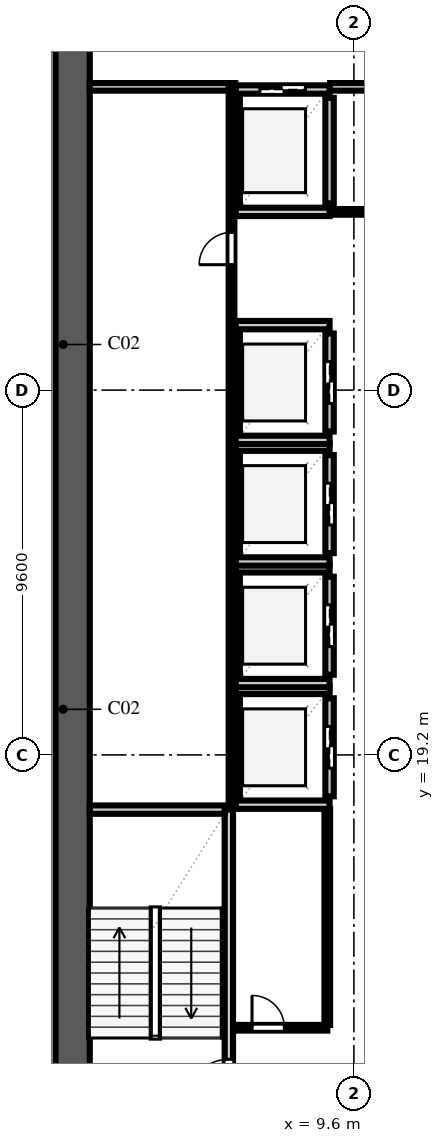
"""IFC4 building model, lengths in metres.
Left out: names, types, materials, properties, quantities, classifications, styles, units other than length and angle.
Written with IfcOpenShell. Run it as: python <this file> out.ifc"""

import sys

from ifc_helpers import new_model, si_unit, direction, frame, frame_2d, origin, place, context, subcontext, project, spatial, rectangle, extrude, element, fill, save


model = new_model("IFC4")
c1 = context("Model", 3, precision=1e-05, world=origin(), true_north=direction((0.0, 1.0)))
c2 = subcontext(c1, "Body", "Model", "MODEL_VIEW")
j1 = project(units=[si_unit("LENGTHUNIT", "METRE"), si_unit("PLANEANGLEUNIT", "RADIAN")], contexts=[c1])
p1 = place(None, origin())
s1 = spatial("IfcSite", under=j1, at=p1, CompositionType="ELEMENT")
p2 = place(p1, origin())
s2 = spatial("IfcBuilding", under=s1, at=p2, CompositionType="ELEMENT")
p3 = place(p2, frame((0.0, 0.0, 19.6)))
s3 = spatial("IfcBuildingStorey", under=s2, at=p3, CompositionType="ELEMENT", Elevation=19.6)
p4 = place(p3, frame((2.2, 9.15, 0.0), z_axis=(0.0, 0.0, 1.0), x_axis=(0.0, 1.0, 0.0)))
e1 = element("IfcWall", 1, at=p4, inside=s3, PredefinedType="SHEAR", context=c2, shape_type="SweptSolid", body=[
    extrude(rectangle(XDim=39.3, YDim=0.9, at=frame_2d((19.65, 0.0))), origin(), (0.0, 0.0, 1.0), 4.34),
])
p5 = place(p3, frame((6.31, 9.95, 0.0), z_axis=(0.0, 0.0, 1.0), x_axis=(0.0, 1.0, 0.0)))
e2 = element("IfcWall", 2, at=p5, inside=s3, PredefinedType="SOLIDWALL", context=c2, shape_type="SweptSolid", body=[
    extrude(rectangle(XDim=7.81, YDim=0.22, at=frame_2d((3.905, 0.0))), origin(), (0.0, 0.0, 1.0), 4.34),
])
p6 = place(p5, frame((0.14, 0.0, 0.0)))
e3 = element("IfcOpeningElement", 3, at=p6, cuts=e2, PredefinedType="OPENING", context=c2, shape_type="SweptSolid", body=[
    extrude(rectangle(XDim=1.1, YDim=2.2, at=frame_2d((0.55, 1.1))), frame((0.0, 0.122, 0.0), z_axis=(0.0, -1.0, 0.0), x_axis=(1.0, 0.0, 0.0)), (0.0, 0.0, 1.0), 0.244),
])
p7 = place(p3, frame((2.65, 17.76, 0.0), z_axis=(0.0, 0.0, 1.0), x_axis=(1.0, 0.0, 0.0)))
e4 = element("IfcWall", 4, at=p7, inside=s3, PredefinedType="SOLIDWALL", context=c2, shape_type="SweptSolid", body=[
    extrude(rectangle(XDim=3.55, YDim=0.22, at=frame_2d((1.775, 0.0))), origin(), (0.0, 0.0, 1.0), 4.34),
])
p8 = place(p3, frame((6.49, 18.11, 0.0), z_axis=(0.0, 0.0, 1.0), x_axis=(0.0, 1.0, 0.0)))
e5 = element("IfcWall", 5, at=p8, inside=s3, PredefinedType="SOLIDWALL", context=c2, shape_type="SweptSolid", body=[
    extrude(rectangle(XDim=2.58, YDim=0.22, at=frame_2d((1.29, 0.0))), origin(), (0.0, 0.0, 1.0), 4.34),
])
p9 = place(p3, frame((8.96, 18.11, 0.0), z_axis=(0.0, 0.0, 1.0), x_axis=(0.0, 1.0, 0.0)))
e6 = element("IfcWall", 6, at=p9, inside=s3, PredefinedType="SOLIDWALL", context=c2, shape_type="SweptSolid", body=[
    extrude(rectangle(XDim=2.58, YDim=0.22, at=frame_2d((1.29, 0.0))), origin(), (0.0, 0.0, 1.0), 4.34),
])
p10 = place(p9, frame((0.74, 0.0, 0.0)))
e7 = element("IfcOpeningElement", 7, at=p10, cuts=e6, PredefinedType="OPENING", context=c2, shape_type="SweptSolid", body=[
    extrude(rectangle(XDim=1.1, YDim=2.2, at=frame_2d((0.55, 1.1))), frame((0.0, 0.122, 0.0), z_axis=(0.0, -1.0, 0.0), x_axis=(1.0, 0.0, 0.0)), (0.0, 0.0, 1.0), 0.244),
])
for number, where, z_axis, x_axis in (
    (8, (6.49, 17.89, 0.0), (0.0, 0.0, 1.0), (1.0, 0.0, 0.0)),
    (9, (6.49, 20.91, 0.0), (0.0, 0.0, 1.0), (1.0, 0.0, 0.0)),
):
    element("IfcWall", number, at=place(p3, frame(where, z_axis=z_axis, x_axis=x_axis)), inside=s3, PredefinedType="SOLIDWALL", context=c2, shape_type="SweptSolid", body=[
        extrude(rectangle(XDim=2.47, YDim=0.22, at=frame_2d((1.235, 0.0))), origin(), (0.0, 0.0, 1.0), 4.34),
    ])
p11 = place(p3, frame((6.49, 21.31, 0.0), z_axis=(0.0, 0.0, 1.0), x_axis=(0.0, 1.0, 0.0)))
e10 = element("IfcWall", 10, at=p11, inside=s3, PredefinedType="SOLIDWALL", context=c2, shape_type="SweptSolid", body=[
    extrude(rectangle(XDim=2.58, YDim=0.22, at=frame_2d((1.29, 0.0))), origin(), (0.0, 0.0, 1.0), 4.34),
])
p12 = place(p3, frame((8.96, 21.31, 0.0), z_axis=(0.0, 0.0, 1.0), x_axis=(0.0, 1.0, 0.0)))
e11 = element("IfcWall", 11, at=p12, inside=s3, PredefinedType="SOLIDWALL", context=c2, shape_type="SweptSolid", body=[
    extrude(rectangle(XDim=2.58, YDim=0.22, at=frame_2d((1.29, 0.0))), origin(), (0.0, 0.0, 1.0), 4.34),
])
p13 = place(p12, frame((0.74, 0.0, 0.0)))
e12 = element("IfcOpeningElement", 12, at=p13, cuts=e11, PredefinedType="OPENING", context=c2, shape_type="SweptSolid", body=[
    extrude(rectangle(XDim=1.1, YDim=2.2, at=frame_2d((0.55, 1.1))), frame((0.0, 0.122, 0.0), z_axis=(0.0, -1.0, 0.0), x_axis=(1.0, 0.0, 0.0)), (0.0, 0.0, 1.0), 0.244),
])
for number, where, z_axis, x_axis in (
    (13, (6.49, 21.09, 0.0), (0.0, 0.0, 1.0), (1.0, 0.0, 0.0)),
    (14, (6.49, 24.11, 0.0), (0.0, 0.0, 1.0), (1.0, 0.0, 0.0)),
):
    element("IfcWall", number, at=place(p3, frame(where, z_axis=z_axis, x_axis=x_axis)), inside=s3, PredefinedType="SOLIDWALL", context=c2, shape_type="SweptSolid", body=[
        extrude(rectangle(XDim=2.47, YDim=0.22, at=frame_2d((1.235, 0.0))), origin(), (0.0, 0.0, 1.0), 4.34),
    ])
p14 = place(p3, frame((6.49, 24.51, 0.0), z_axis=(0.0, 0.0, 1.0), x_axis=(0.0, 1.0, 0.0)))
e15 = element("IfcWall", 15, at=p14, inside=s3, PredefinedType="SOLIDWALL", context=c2, shape_type="SweptSolid", body=[
    extrude(rectangle(XDim=2.58, YDim=0.22, at=frame_2d((1.29, 0.0))), origin(), (0.0, 0.0, 1.0), 4.34),
])
p15 = place(p3, frame((8.96, 24.51, 0.0), z_axis=(0.0, 0.0, 1.0), x_axis=(0.0, 1.0, 0.0)))
e16 = element("IfcWall", 16, at=p15, inside=s3, PredefinedType="SOLIDWALL", context=c2, shape_type="SweptSolid", body=[
    extrude(rectangle(XDim=2.58, YDim=0.22, at=frame_2d((1.29, 0.0))), origin(), (0.0, 0.0, 1.0), 4.34),
])
p16 = place(p15, frame((0.74, 0.0, 0.0)))
e17 = element("IfcOpeningElement", 17, at=p16, cuts=e16, PredefinedType="OPENING", context=c2, shape_type="SweptSolid", body=[
    extrude(rectangle(XDim=1.1, YDim=2.2, at=frame_2d((0.55, 1.1))), frame((0.0, 0.122, 0.0), z_axis=(0.0, -1.0, 0.0), x_axis=(1.0, 0.0, 0.0)), (0.0, 0.0, 1.0), 0.244),
])
for number, where, z_axis, x_axis in (
    (18, (6.49, 24.29, 0.0), (0.0, 0.0, 1.0), (1.0, 0.0, 0.0)),
    (19, (6.49, 27.31, 0.0), (0.0, 0.0, 1.0), (1.0, 0.0, 0.0)),
):
    element("IfcWall", number, at=place(p3, frame(where, z_axis=z_axis, x_axis=x_axis)), inside=s3, PredefinedType="SOLIDWALL", context=c2, shape_type="SweptSolid", body=[
        extrude(rectangle(XDim=2.47, YDim=0.22, at=frame_2d((1.235, 0.0))), origin(), (0.0, 0.0, 1.0), 4.34),
    ])
p17 = place(p3, frame((6.49, 27.71, 0.0), z_axis=(0.0, 0.0, 1.0), x_axis=(0.0, 1.0, 0.0)))
e20 = element("IfcWall", 20, at=p17, inside=s3, PredefinedType="SOLIDWALL", context=c2, shape_type="SweptSolid", body=[
    extrude(rectangle(XDim=2.58, YDim=0.22, at=frame_2d((1.29, 0.0))), origin(), (0.0, 0.0, 1.0), 4.34),
])
p18 = place(p3, frame((8.96, 27.71, 0.0), z_axis=(0.0, 0.0, 1.0), x_axis=(0.0, 1.0, 0.0)))
e21 = element("IfcWall", 21, at=p18, inside=s3, PredefinedType="SOLIDWALL", context=c2, shape_type="SweptSolid", body=[
    extrude(rectangle(XDim=2.58, YDim=0.22, at=frame_2d((1.29, 0.0))), origin(), (0.0, 0.0, 1.0), 4.34),
])
p19 = place(p18, frame((0.74, 0.0, 0.0)))
e22 = element("IfcOpeningElement", 22, at=p19, cuts=e21, PredefinedType="OPENING", context=c2, shape_type="SweptSolid", body=[
    extrude(rectangle(XDim=1.1, YDim=2.2, at=frame_2d((0.55, 1.1))), frame((0.0, 0.122, 0.0), z_axis=(0.0, -1.0, 0.0), x_axis=(1.0, 0.0, 0.0)), (0.0, 0.0, 1.0), 0.244),
])
for number, where, z_axis, x_axis in (
    (23, (6.49, 27.49, 0.0), (0.0, 0.0, 1.0), (1.0, 0.0, 0.0)),
    (24, (6.49, 30.51, 0.0), (0.0, 0.0, 1.0), (1.0, 0.0, 0.0)),
):
    element("IfcWall", number, at=place(p3, frame(where, z_axis=z_axis, x_axis=x_axis)), inside=s3, PredefinedType="SOLIDWALL", context=c2, shape_type="SweptSolid", body=[
        extrude(rectangle(XDim=2.47, YDim=0.22, at=frame_2d((1.235, 0.0))), origin(), (0.0, 0.0, 1.0), 4.34),
    ])
for number, where, z_axis, x_axis in (
    (25, (6.49, 33.71, 0.0), (0.0, 0.0, 1.0), (0.0, 1.0, 0.0)),
    (26, (8.96, 33.71, 0.0), (0.0, 0.0, 1.0), (0.0, 1.0, 0.0)),
):
    element("IfcWall", number, at=place(p3, frame(where, z_axis=z_axis, x_axis=x_axis)), inside=s3, PredefinedType="SOLIDWALL", context=c2, shape_type="SweptSolid", body=[
        extrude(rectangle(XDim=2.78, YDim=0.22, at=frame_2d((1.39, 0.0))), origin(), (0.0, 0.0, 1.0), 4.34),
    ])
p20 = place(p3, frame((6.49, 33.49, 0.0), z_axis=(0.0, 0.0, 1.0), x_axis=(1.0, 0.0, 0.0)))
e27 = element("IfcWall", 27, at=p20, inside=s3, PredefinedType="SOLIDWALL", context=c2, shape_type="SweptSolid", body=[
    extrude(rectangle(XDim=2.47, YDim=0.22, at=frame_2d((1.235, 0.0))), origin(), (0.0, 0.0, 1.0), 4.34),
])
p21 = place(p3, frame((6.49, 36.71, 0.0), z_axis=(0.0, 0.0, 1.0), x_axis=(1.0, 0.0, 0.0)))
e28 = element("IfcWall", 28, at=p21, inside=s3, PredefinedType="SOLIDWALL", context=c2, shape_type="SweptSolid", body=[
    extrude(rectangle(XDim=2.47, YDim=0.22, at=frame_2d((1.235, 0.0))), origin(), (0.0, 0.0, 1.0), 4.34),
])
p22 = place(p21, frame((0.635, 0.0, 0.0)))
e29 = element("IfcOpeningElement", 29, at=p22, cuts=e28, PredefinedType="OPENING", context=c2, shape_type="SweptSolid", body=[
    extrude(rectangle(XDim=1.2, YDim=2.2, at=frame_2d((0.6, 1.1))), frame((0.0, 0.122, 0.0), z_axis=(0.0, -1.0, 0.0), x_axis=(1.0, 0.0, 0.0)), (0.0, 0.0, 1.0), 0.244),
])
p23 = place(p3, frame((2.65, 36.78, 0.0), z_axis=(0.0, 0.0, 1.0), x_axis=(1.0, 0.0, 0.0)))
e30 = element("IfcWall", 30, at=p23, inside=s3, PredefinedType="SOLIDWALL", context=c2, shape_type="SweptSolid", body=[
    extrude(rectangle(XDim=3.83, YDim=0.2, at=frame_2d((1.915, 0.0))), origin(), (0.0, 0.0, 1.0), 4.34),
])
p24 = place(p3, frame((8.97, 36.78, 0.0), z_axis=(0.0, 0.0, 1.0), x_axis=(1.0, 0.0, 0.0)))
e31 = element("IfcWall", 31, at=p24, inside=s3, PredefinedType="SOLIDWALL", context=c2, shape_type="SweptSolid", body=[
    extrude(rectangle(XDim=1.51, YDim=0.2, at=frame_2d((0.755, 0.0))), origin(), (0.0, 0.0, 1.0), 4.34),
])
p25 = place(p3, frame((8.965, 33.49, 0.0), z_axis=(0.0, 0.0, 1.0), x_axis=(1.0, 0.0, 0.0)))
e32 = element("IfcWall", 32, at=p25, inside=s3, PredefinedType="PARTITIONING", context=c2, shape_type="SweptSolid", body=[
    extrude(rectangle(XDim=1.52, YDim=0.15, at=frame_2d((0.76, 0.0))), origin(), (0.0, 0.0, 1.0), 4.34),
])
p26 = place(p3, frame((6.42, 12.02, 0.0), z_axis=(0.0, 0.0, 1.0), x_axis=(1.0, 0.0, 0.0)))
e33 = element("IfcWall", 33, at=p26, inside=s3, PredefinedType="PARTITIONING", context=c2, shape_type="SweptSolid", body=[
    extrude(rectangle(XDim=2.48, YDim=0.15, at=frame_2d((1.24, 0.0))), origin(), (0.0, 0.0, 1.0), 4.34),
])
p27 = place(p26, frame((0.5, 0.0, 0.0)))
e34 = element("IfcOpeningElement", 34, at=p27, cuts=e33, PredefinedType="OPENING", context=c2, shape_type="SweptSolid", body=[
    extrude(rectangle(XDim=0.85, YDim=2.1, at=frame_2d((0.425, 1.05))), frame((0.0, 0.087, 0.0), z_axis=(0.0, -1.0, 0.0), x_axis=(1.0, 0.0, 0.0)), (0.0, 0.0, 1.0), 0.174),
])
p28 = place(p3, frame((8.9, 12.095, 0.0), z_axis=(0.0, 0.0, 1.0), x_axis=(0.0, 1.0, 0.0)))
e35 = element("IfcWall", 35, at=p28, inside=s3, PredefinedType="PARTITIONING", context=c2, shape_type="SweptSolid", body=[
    extrude(rectangle(XDim=5.68, YDim=0.15, at=frame_2d((2.84, 0.0))), origin(), (0.0, 0.0, 1.0), 4.34),
])
p29 = place(p3, frame((6.38, 17.8, 0.0), z_axis=(0.0, 0.0, 1.0), x_axis=(0.0, 1.0, 0.0)))
e36 = element("IfcWall", 36, at=p29, inside=s3, PredefinedType="PARTITIONING", context=c2, shape_type="SweptSolid", body=[
    extrude(rectangle(XDim=18.98, YDim=0.15, at=frame_2d((9.49, 0.0))), origin(), (0.0, 0.0, 1.0), 4.34),
])
p30 = place(p29, frame((14.3, 0.0, 0.0)))
e37 = element("IfcOpeningElement", 37, at=p30, cuts=e36, PredefinedType="OPENING", context=c2, shape_type="SweptSolid", body=[
    extrude(rectangle(XDim=0.85, YDim=2.1, at=frame_2d((0.425, 1.05))), frame((0.0, 0.087, 0.0), z_axis=(0.0, -1.0, 0.0), x_axis=(1.0, 0.0, 0.0)), (0.0, 0.0, 1.0), 0.174),
])
p31 = place(p6, origin())
e38 = element("IfcDoor", 38, at=p31, inside=s3, OperationType="SINGLE_SWING_LEFT", PredefinedType="DOOR", context=c2, shape_type="SweptSolid", body=[
    extrude(rectangle(XDim=1.1, YDim=2.2, at=frame_2d((0.55, 1.1))), frame((0.0, 0.025, 0.0), z_axis=(0.0, -1.0, 0.0), x_axis=(1.0, 0.0, 0.0)), (0.0, 0.0, 1.0), 0.05),
])
fill(e3, e38)
p32 = place(p10, origin())
e39 = element("IfcDoor", 39, at=p32, inside=s3, OperationType="DOUBLE_DOOR_SLIDING", PredefinedType="DOOR", context=c2, shape_type="SweptSolid", body=[
    extrude(rectangle(XDim=1.1, YDim=2.2, at=frame_2d((0.55, 1.1))), frame((0.0, 0.025, 0.0), z_axis=(0.0, -1.0, 0.0), x_axis=(1.0, 0.0, 0.0)), (0.0, 0.0, 1.0), 0.05),
])
fill(e7, e39)
p33 = place(p13, origin())
e40 = element("IfcDoor", 40, at=p33, inside=s3, OperationType="DOUBLE_DOOR_SLIDING", PredefinedType="DOOR", context=c2, shape_type="SweptSolid", body=[
    extrude(rectangle(XDim=1.1, YDim=2.2, at=frame_2d((0.55, 1.1))), frame((0.0, 0.025, 0.0), z_axis=(0.0, -1.0, 0.0), x_axis=(1.0, 0.0, 0.0)), (0.0, 0.0, 1.0), 0.05),
])
fill(e12, e40)
p34 = place(p16, origin())
e41 = element("IfcDoor", 41, at=p34, inside=s3, OperationType="DOUBLE_DOOR_SLIDING", PredefinedType="DOOR", context=c2, shape_type="SweptSolid", body=[
    extrude(rectangle(XDim=1.1, YDim=2.2, at=frame_2d((0.55, 1.1))), frame((0.0, 0.025, 0.0), z_axis=(0.0, -1.0, 0.0), x_axis=(1.0, 0.0, 0.0)), (0.0, 0.0, 1.0), 0.05),
])
fill(e17, e41)
p35 = place(p19, origin())
e42 = element("IfcDoor", 42, at=p35, inside=s3, OperationType="DOUBLE_DOOR_SLIDING", PredefinedType="DOOR", context=c2, shape_type="SweptSolid", body=[
    extrude(rectangle(XDim=1.1, YDim=2.2, at=frame_2d((0.55, 1.1))), frame((0.0, 0.025, 0.0), z_axis=(0.0, -1.0, 0.0), x_axis=(1.0, 0.0, 0.0)), (0.0, 0.0, 1.0), 0.05),
])
fill(e22, e42)
p36 = place(p22, origin())
e43 = element("IfcDoor", 43, at=p36, inside=s3, OperationType="DOUBLE_DOOR_SLIDING", PredefinedType="DOOR", context=c2, shape_type="SweptSolid", body=[
    extrude(rectangle(XDim=1.2, YDim=2.2, at=frame_2d((0.6, 1.1))), frame((0.0, 0.025, 0.0), z_axis=(0.0, -1.0, 0.0), x_axis=(1.0, 0.0, 0.0)), (0.0, 0.0, 1.0), 0.05),
])
fill(e29, e43)
p37 = place(p27, origin())
e44 = element("IfcDoor", 44, at=p37, inside=s3, OperationType="SINGLE_SWING_LEFT", PredefinedType="DOOR", context=c2, shape_type="SweptSolid", body=[
    extrude(rectangle(XDim=0.85, YDim=2.1, at=frame_2d((0.425, 1.05))), frame((0.0, 0.025, 0.0), z_axis=(0.0, -1.0, 0.0), x_axis=(1.0, 0.0, 0.0)), (0.0, 0.0, 1.0), 0.05),
])
fill(e34, e44)
p38 = place(p30, origin())
e45 = element("IfcDoor", 45, at=p38, inside=s3, OperationType="SINGLE_SWING_LEFT", PredefinedType="DOOR", context=c2, shape_type="SweptSolid", body=[
    extrude(rectangle(XDim=0.85, YDim=2.1, at=frame_2d((0.425, 1.05))), frame((0.0, 0.025, 0.0), z_axis=(0.0, -1.0, 0.0), x_axis=(1.0, 0.0, 0.0)), (0.0, 0.0, 1.0), 0.05),
])
fill(e37, e45)
save(model, sys.argv[1])
